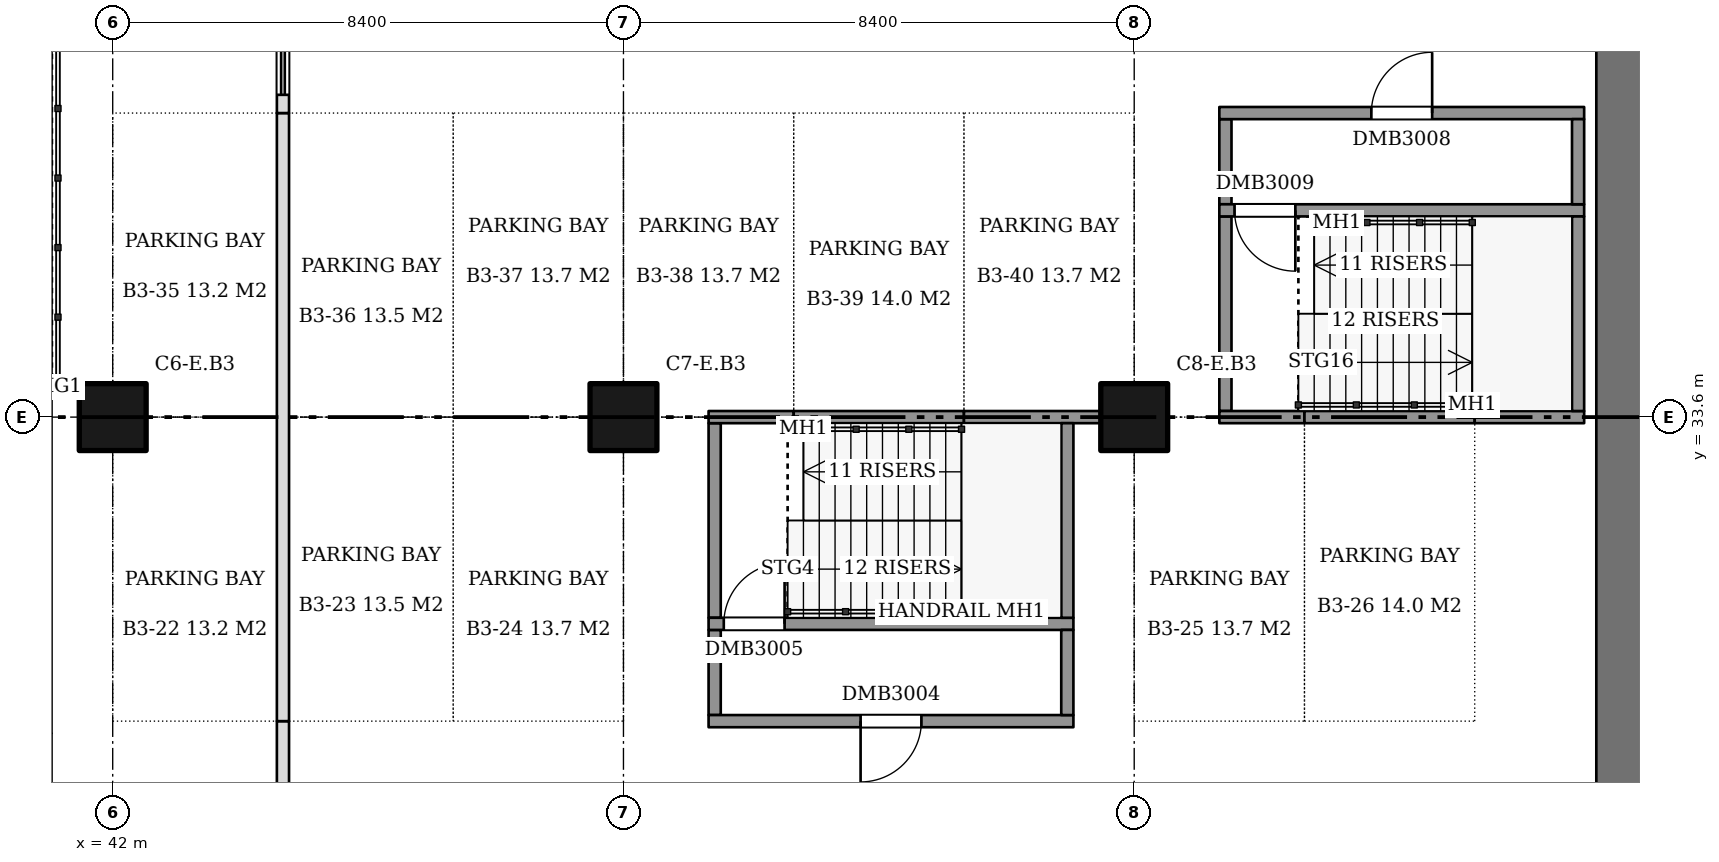
"""IFC4 building model, lengths in metres.
Left out: names, types, materials, properties, quantities, classifications, styles, units other than length and angle.
Written with IfcOpenShell. Run it as: python <this file> out.ifc"""

import sys

from ifc_helpers import new_model, si_unit, direction, frame, frame_2d, origin, origin_2d, place, context, subcontext, project, spatial, rectangle, extrude, element, fill, save


model = new_model("IFC4")
c1 = context("Model", 3, precision=1e-05, world=origin(), true_north=direction((0.0, 1.0)))
c2 = subcontext(c1, "Body", "Model", "MODEL_VIEW")
j1 = project(units=[si_unit("LENGTHUNIT", "METRE"), si_unit("PLANEANGLEUNIT", "RADIAN")], contexts=[c1])
p1 = place(None, origin())
s1 = spatial("IfcSite", under=j1, at=p1, CompositionType="ELEMENT")
p2 = place(p1, origin())
s2 = spatial("IfcBuilding", under=s1, at=p2, CompositionType="ELEMENT")
p3 = place(p2, frame((0.0, 0.0, -12.0)))
s3 = spatial("IfcBuildingStorey", under=s2, at=p3, CompositionType="ELEMENT", Elevation=-12.0)
p4 = place(p3, frame((66.8, 0.4, 0.0), z_axis=(0.0, 0.0, 1.0), x_axis=(0.0, 1.0, 0.0)))
e1 = element("IfcWall", 1, at=p4, inside=s3, PredefinedType="SOLIDWALL", context=c2, shape_type="SweptSolid", body=[
    extrude(rectangle(XDim=58.0, YDim=0.8, at=frame_2d((29.0, 0.0))), origin(), (0.0, 0.0, 1.0), 3.7),
])
for number, where, z_axis, x_axis in (
    (2, (42.0, 33.6, 0.0), (0.0, 0.0, 1.0), (1.0, 0.0, 0.0)),
    (3, (50.4, 33.6, 0.0), (0.0, 0.0, 1.0), (1.0, 0.0, 0.0)),
    (4, (58.8, 33.6, 0.0), (0.0, 0.0, 1.0), (1.0, 0.0, 0.0)),
):
    element("IfcColumn", number, at=place(p3, frame(where, z_axis=z_axis, x_axis=x_axis)), inside=s3, PredefinedType="COLUMN", context=c2, shape_type="SweptSolid", body=[
        extrude(rectangle(XDim=1.1, YDim=1.1, at=origin_2d()), origin(), (0.0, 0.0, 1.0), 3.7),
    ])
p5 = place(p3, frame((51.9, 28.7, 0.0), z_axis=(0.0, 0.0, 1.0), x_axis=(0.0, 1.0, 0.0)))
e5 = element("IfcWall", 5, at=p5, inside=s3, PredefinedType="SOLIDWALL", context=c2, shape_type="SweptSolid", body=[
    extrude(rectangle(XDim=1.4, YDim=0.2, at=frame_2d((0.7, 0.0))), origin(), (0.0, 0.0, 1.0), 3.7),
])
p6 = place(p3, frame((51.8, 28.6, 0.0), z_axis=(0.0, 0.0, 1.0), x_axis=(1.0, 0.0, 0.0)))
e6 = element("IfcWall", 6, at=p6, inside=s3, PredefinedType="SOLIDWALL", context=c2, shape_type="SweptSolid", body=[
    extrude(rectangle(XDim=6.0, YDim=0.2, at=frame_2d((3.0, 0.0))), origin(), (0.0, 0.0, 1.0), 3.7),
])
p7 = place(p6, frame((2.5, 0.0, 0.0)))
e7 = element("IfcOpeningElement", 7, at=p7, cuts=e6, PredefinedType="OPENING", context=c2, shape_type="SweptSolid", body=[
    extrude(rectangle(XDim=1.0, YDim=2.1, at=frame_2d((0.5, 1.05))), frame((0.0, 0.11, 0.0), z_axis=(0.0, -1.0, 0.0), x_axis=(1.0, 0.0, 0.0)), (0.0, 0.0, 1.0), 0.22),
])
p8 = place(p3, frame((51.9, 30.3, 0.0), z_axis=(0.0, 0.0, 1.0), x_axis=(0.0, 1.0, 0.0)))
e8 = element("IfcWall", 8, at=p8, inside=s3, PredefinedType="SOLIDWALL", context=c2, shape_type="SweptSolid", body=[
    extrude(rectangle(XDim=3.2, YDim=0.2, at=frame_2d((1.6, 0.0))), origin(), (0.0, 0.0, 1.0), 3.7),
])
p9 = place(p3, frame((51.8, 30.2, 0.0), z_axis=(0.0, 0.0, 1.0), x_axis=(1.0, 0.0, 0.0)))
e9 = element("IfcWall", 9, at=p9, inside=s3, PredefinedType="SOLIDWALL", context=c2, shape_type="SweptSolid", body=[
    extrude(rectangle(XDim=6.0, YDim=0.2, at=frame_2d((3.0, 0.0))), origin(), (0.0, 0.0, 1.0), 3.7),
])
p10 = place(p9, frame((0.25, 0.0, 0.0)))
e10 = element("IfcOpeningElement", 10, at=p10, cuts=e9, PredefinedType="OPENING", context=c2, shape_type="SweptSolid", body=[
    extrude(rectangle(XDim=1.0, YDim=2.1, at=frame_2d((0.5, 1.05))), frame((0.0, 0.11, 0.0), z_axis=(0.0, -1.0, 0.0), x_axis=(1.0, 0.0, 0.0)), (0.0, 0.0, 1.0), 0.22),
])
p11 = place(p3, frame((51.8, 33.6, 0.0), z_axis=(0.0, 0.0, 1.0), x_axis=(1.0, 0.0, 0.0)))
e11 = element("IfcWall", 11, at=p11, inside=s3, PredefinedType="SOLIDWALL", context=c2, shape_type="SweptSolid", body=[
    extrude(rectangle(XDim=1.4, YDim=0.2, at=frame_2d((0.7, 0.0))), origin(), (0.0, 0.0, 1.0), 3.7),
])
p12 = place(p3, frame((53.2, 33.6, 0.0), z_axis=(0.0, 0.0, 1.0), x_axis=(1.0, 0.0, 0.0)))
e12 = element("IfcWall", 12, at=p12, inside=s3, PredefinedType="SOLIDWALL", context=c2, shape_type="SweptSolid", body=[
    extrude(rectangle(XDim=2.8, YDim=0.2, at=frame_2d((1.4, 0.0))), origin(), (0.0, 0.0, 1.0), 3.7),
])
p13 = place(p3, frame((56.0, 33.6, 0.0), z_axis=(0.0, 0.0, 1.0), x_axis=(1.0, 0.0, 0.0)))
e13 = element("IfcWall", 13, at=p13, inside=s3, PredefinedType="SOLIDWALL", context=c2, shape_type="SweptSolid", body=[
    extrude(rectangle(XDim=2.25, YDim=0.2, at=frame_2d((1.125, 0.0))), origin(), (0.0, 0.0, 1.0), 3.7),
])
p14 = place(p3, frame((57.7, 28.7, 0.0), z_axis=(0.0, 0.0, 1.0), x_axis=(0.0, 1.0, 0.0)))
e14 = element("IfcWall", 14, at=p14, inside=s3, PredefinedType="SOLIDWALL", context=c2, shape_type="SweptSolid", body=[
    extrude(rectangle(XDim=1.4, YDim=0.2, at=frame_2d((0.7, 0.0))), origin(), (0.0, 0.0, 1.0), 3.7),
])
for number, where, z_axis, x_axis in (
    (15, (57.7, 30.3, 0.0), (0.0, 0.0, 1.0), (0.0, 1.0, 0.0)),
    (16, (60.3, 33.7, 0.0), (0.0, 0.0, 1.0), (0.0, 1.0, 0.0)),
):
    element("IfcWall", number, at=place(p3, frame(where, z_axis=z_axis, x_axis=x_axis)), inside=s3, PredefinedType="SOLIDWALL", context=c2, shape_type="SweptSolid", body=[
        extrude(rectangle(XDim=3.2, YDim=0.2, at=frame_2d((1.6, 0.0))), origin(), (0.0, 0.0, 1.0), 3.7),
    ])
p15 = place(p3, frame((60.2, 33.6, 0.0), z_axis=(0.0, 0.0, 1.0), x_axis=(1.0, 0.0, 0.0)))
e17 = element("IfcWall", 17, at=p15, inside=s3, PredefinedType="SOLIDWALL", context=c2, shape_type="SweptSolid", body=[
    extrude(rectangle(XDim=1.4, YDim=0.2, at=frame_2d((0.7, 0.0))), origin(), (0.0, 0.0, 1.0), 3.7),
])
p16 = place(p3, frame((60.3, 37.1, 0.0), z_axis=(0.0, 0.0, 1.0), x_axis=(0.0, 1.0, 0.0)))
e18 = element("IfcWall", 18, at=p16, inside=s3, PredefinedType="SOLIDWALL", context=c2, shape_type="SweptSolid", body=[
    extrude(rectangle(XDim=1.4, YDim=0.2, at=frame_2d((0.7, 0.0))), origin(), (0.0, 0.0, 1.0), 3.7),
])
p17 = place(p3, frame((60.2, 37.0, 0.0), z_axis=(0.0, 0.0, 1.0), x_axis=(1.0, 0.0, 0.0)))
e19 = element("IfcWall", 19, at=p17, inside=s3, PredefinedType="SOLIDWALL", context=c2, shape_type="SweptSolid", body=[
    extrude(rectangle(XDim=6.0, YDim=0.2, at=frame_2d((3.0, 0.0))), origin(), (0.0, 0.0, 1.0), 3.7),
])
p18 = place(p17, frame((0.25, 0.0, 0.0)))
e20 = element("IfcOpeningElement", 20, at=p18, cuts=e19, PredefinedType="OPENING", context=c2, shape_type="SweptSolid", body=[
    extrude(rectangle(XDim=1.0, YDim=2.1, at=frame_2d((0.5, 1.05))), frame((0.0, 0.11, 0.0), z_axis=(0.0, -1.0, 0.0), x_axis=(1.0, 0.0, 0.0)), (0.0, 0.0, 1.0), 0.22),
])
p19 = place(p3, frame((60.2, 38.6, 0.0), z_axis=(0.0, 0.0, 1.0), x_axis=(1.0, 0.0, 0.0)))
e21 = element("IfcWall", 21, at=p19, inside=s3, PredefinedType="SOLIDWALL", context=c2, shape_type="SweptSolid", body=[
    extrude(rectangle(XDim=6.0, YDim=0.2, at=frame_2d((3.0, 0.0))), origin(), (0.0, 0.0, 1.0), 3.7),
])
p20 = place(p19, frame((2.5, 0.0, 0.0)))
e22 = element("IfcOpeningElement", 22, at=p20, cuts=e21, PredefinedType="OPENING", context=c2, shape_type="SweptSolid", body=[
    extrude(rectangle(XDim=1.0, YDim=2.1, at=frame_2d((0.5, 1.05))), frame((0.0, 0.11, 0.0), z_axis=(0.0, -1.0, 0.0), x_axis=(1.0, 0.0, 0.0)), (0.0, 0.0, 1.0), 0.22),
])
p21 = place(p3, frame((61.6, 33.6, 0.0), z_axis=(0.0, 0.0, 1.0), x_axis=(1.0, 0.0, 0.0)))
e23 = element("IfcWall", 23, at=p21, inside=s3, PredefinedType="SOLIDWALL", context=c2, shape_type="SweptSolid", body=[
    extrude(rectangle(XDim=2.8, YDim=0.2, at=frame_2d((1.4, 0.0))), origin(), (0.0, 0.0, 1.0), 3.7),
])
p22 = place(p3, frame((64.4, 33.6, 0.0), z_axis=(0.0, 0.0, 1.0), x_axis=(1.0, 0.0, 0.0)))
e24 = element("IfcWall", 24, at=p22, inside=s3, PredefinedType="SOLIDWALL", context=c2, shape_type="SweptSolid", body=[
    extrude(rectangle(XDim=1.8, YDim=0.2, at=frame_2d((0.9, 0.0))), origin(), (0.0, 0.0, 1.0), 3.7),
])
p23 = place(p3, frame((66.1, 33.7, 0.0), z_axis=(0.0, 0.0, 1.0), x_axis=(0.0, 1.0, 0.0)))
e25 = element("IfcWall", 25, at=p23, inside=s3, PredefinedType="SOLIDWALL", context=c2, shape_type="SweptSolid", body=[
    extrude(rectangle(XDim=3.2, YDim=0.2, at=frame_2d((1.6, 0.0))), origin(), (0.0, 0.0, 1.0), 3.7),
])
p24 = place(p3, frame((66.1, 37.1, 0.0), z_axis=(0.0, 0.0, 1.0), x_axis=(0.0, 1.0, 0.0)))
e26 = element("IfcWall", 26, at=p24, inside=s3, PredefinedType="SOLIDWALL", context=c2, shape_type="SweptSolid", body=[
    extrude(rectangle(XDim=1.4, YDim=0.2, at=frame_2d((0.7, 0.0))), origin(), (0.0, 0.0, 1.0), 3.7),
])
p25 = place(p3, frame((44.8, 25.2, 0.0), z_axis=(0.0, 0.0, 1.0), x_axis=(0.0, 1.0, 0.0)))
e27 = element("IfcWall", 27, at=p25, inside=s3, PredefinedType="PARTITIONING", context=c2, shape_type="SweptSolid", body=[
    extrude(rectangle(XDim=3.4, YDim=0.2, at=frame_2d((1.7, 0.0))), origin(), (0.0, 0.0, 1.0), 3.7),
])
p26 = place(p3, frame((44.8, 28.6, 0.0), z_axis=(0.0, 0.0, 1.0), x_axis=(0.0, 1.0, 0.0)))
e28 = element("IfcWall", 28, at=p26, inside=s3, PredefinedType="PARTITIONING", context=c2, shape_type="SweptSolid", body=[
    extrude(rectangle(XDim=10.0, YDim=0.2, at=frame_2d((5.0, 0.0))), origin(), (0.0, 0.0, 1.0), 3.7),
])
p27 = place(p3, frame((44.8, 38.6, 0.0), z_axis=(0.0, 0.0, 1.0), x_axis=(0.0, 1.0, 0.0)))
e29 = element("IfcWall", 29, at=p27, inside=s3, PredefinedType="PARTITIONING", context=c2, shape_type="SweptSolid", body=[
    extrude(rectangle(XDim=6.8, YDim=0.2, at=frame_2d((3.4, 0.0))), origin(), (0.0, 0.0, 1.0), 3.7),
])
p28 = place(p27, frame((0.3, 0.0, 0.0)))
e30 = element("IfcOpeningElement", 30, at=p28, cuts=e29, PredefinedType="OPENING", context=c2, shape_type="SweptSolid", body=[
    extrude(rectangle(XDim=4.8, YDim=2.4, at=frame_2d((2.4, 1.2))), frame((0.0, 0.11, 0.0), z_axis=(0.0, -1.0, 0.0), x_axis=(1.0, 0.0, 0.0)), (0.0, 0.0, 1.0), 0.22),
])
p29 = place(p27, frame((5.4, 0.0, 0.0)))
e31 = element("IfcOpeningElement", 31, at=p29, cuts=e29, PredefinedType="OPENING", context=c2, shape_type="SweptSolid", body=[
    extrude(rectangle(XDim=1.0, YDim=2.1, at=frame_2d((0.5, 1.05))), frame((0.0, 0.11, 0.0), z_axis=(0.0, -1.0, 0.0), x_axis=(1.0, 0.0, 0.0)), (0.0, 0.0, 1.0), 0.22),
])
p30 = place(p7, frame((1.0, 0.0, 0.0), z_axis=(0.0, 0.0, 1.0), x_axis=(-1.0, 0.0, 0.0)))
e32 = element("IfcDoor", 32, at=p30, inside=s3, OperationType="SINGLE_SWING_RIGHT", PredefinedType="DOOR", context=c2, shape_type="SweptSolid", body=[
    extrude(rectangle(XDim=1.0, YDim=2.1, at=frame_2d((0.5, 1.05))), frame((0.0, 0.025, 0.0), z_axis=(0.0, -1.0, 0.0), x_axis=(1.0, 0.0, 0.0)), (0.0, 0.0, 1.0), 0.05),
])
fill(e7, e32)
p31 = place(p10, origin())
e33 = element("IfcDoor", 33, at=p31, inside=s3, OperationType="SINGLE_SWING_RIGHT", PredefinedType="DOOR", context=c2, shape_type="SweptSolid", body=[
    extrude(rectangle(XDim=1.0, YDim=2.1, at=frame_2d((0.5, 1.05))), frame((0.0, 0.025, 0.0), z_axis=(0.0, -1.0, 0.0), x_axis=(1.0, 0.0, 0.0)), (0.0, 0.0, 1.0), 0.05),
])
fill(e10, e33)
p32 = place(p20, origin())
e34 = element("IfcDoor", 34, at=p32, inside=s3, OperationType="SINGLE_SWING_RIGHT", PredefinedType="DOOR", context=c2, shape_type="SweptSolid", body=[
    extrude(rectangle(XDim=1.0, YDim=2.1, at=frame_2d((0.5, 1.05))), frame((0.0, 0.025, 0.0), z_axis=(0.0, -1.0, 0.0), x_axis=(1.0, 0.0, 0.0)), (0.0, 0.0, 1.0), 0.05),
])
fill(e22, e34)
p33 = place(p18, frame((1.0, 0.0, 0.0), z_axis=(0.0, 0.0, 1.0), x_axis=(-1.0, 0.0, 0.0)))
e35 = element("IfcDoor", 35, at=p33, inside=s3, OperationType="SINGLE_SWING_LEFT", PredefinedType="DOOR", context=c2, shape_type="SweptSolid", body=[
    extrude(rectangle(XDim=1.0, YDim=2.1, at=frame_2d((0.5, 1.05))), frame((0.0, 0.025, 0.0), z_axis=(0.0, -1.0, 0.0), x_axis=(1.0, 0.0, 0.0)), (0.0, 0.0, 1.0), 0.05),
])
fill(e20, e35)
p34 = place(p28, origin())
e36 = element("IfcDoor", 36, at=p34, inside=s3, OperationType="ROLLINGUP", PredefinedType="GATE", context=c2, shape_type="SweptSolid", body=[
    extrude(rectangle(XDim=4.8, YDim=2.4, at=frame_2d((2.4, 1.2))), frame((0.0, 0.025, 0.0), z_axis=(0.0, -1.0, 0.0), x_axis=(1.0, 0.0, 0.0)), (0.0, 0.0, 1.0), 0.05),
])
fill(e30, e36)
save(model, sys.argv[1])
